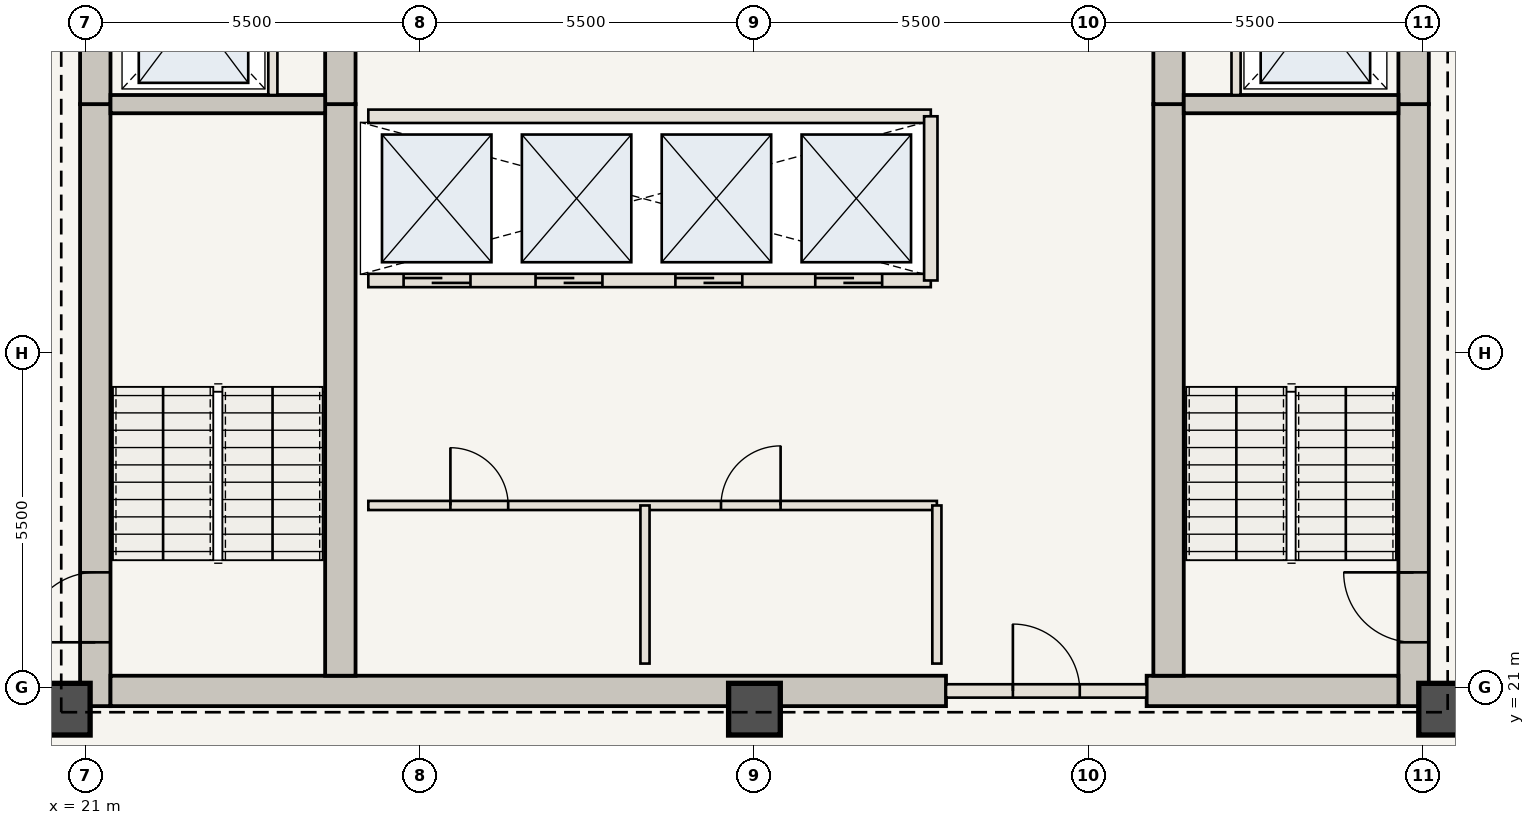
"""IFC4 building model, lengths in metres.
Left out: names, types, materials, properties, quantities, classifications, styles, units other than length and angle.
Written with IfcOpenShell. Run it as: python <this file> out.ifc"""

import sys

from ifc_helpers import new_model, si_unit, direction, frame, frame_2d, origin, origin_2d, place, context, subcontext, project, spatial, rectangle, extrude, element, fill, save


model = new_model("IFC4")
c1 = context("Model", 3, precision=1e-05, world=origin(), true_north=direction((0.0, 1.0)))
c2 = subcontext(c1, "Body", "Model", "MODEL_VIEW")
j1 = project(units=[si_unit("LENGTHUNIT", "METRE"), si_unit("PLANEANGLEUNIT", "RADIAN")], contexts=[c1])
p1 = place(None, origin())
s1 = spatial("IfcSite", under=j1, at=p1, CompositionType="ELEMENT")
p2 = place(p1, origin())
s2 = spatial("IfcBuilding", under=s1, at=p2, CompositionType="ELEMENT")
p3 = place(p2, frame((0.0, 0.0, 236.95)))
s3 = spatial("IfcBuildingStorey", under=s2, at=p3, CompositionType="ELEMENT", Elevation=236.95)
p4 = place(p3, frame((21.16, 20.7, 0.0), z_axis=(0.0, 0.0, 1.0), x_axis=(0.0, 1.0, 0.0)))
e1 = element("IfcWall", 1, at=p4, inside=s3, PredefinedType="SHEAR", context=c2, shape_type="SweptSolid", body=[
    extrude(rectangle(XDim=9.9, YDim=0.5, at=frame_2d((4.95, 0.0))), origin(), (0.0, 0.0, 1.0), 3.85),
])
p5 = place(p4, frame((1.05, 0.0, 0.0)))
e2 = element("IfcOpeningElement", 2, at=p5, cuts=e1, PredefinedType="OPENING", context=c2, shape_type="SweptSolid", body=[
    extrude(rectangle(XDim=1.15, YDim=2.15, at=frame_2d((0.575, 1.075))), frame((0.0, 0.26, 0.0), z_axis=(0.0, -1.0, 0.0), x_axis=(1.0, 0.0, 0.0)), (0.0, 0.0, 1.0), 0.52),
])
p6 = place(p3, frame((21.16, 30.6, 0.0), z_axis=(0.0, 0.0, 1.0), x_axis=(0.0, 1.0, 0.0)))
e3 = element("IfcWall", 3, at=p6, inside=s3, PredefinedType="SHEAR", context=c2, shape_type="SweptSolid", body=[
    extrude(rectangle(XDim=12.65, YDim=0.5, at=frame_2d((6.325, 0.0))), origin(), (0.0, 0.0, 1.0), 3.85),
])
p7 = place(p6, frame((4.2, 0.0, 0.0)))
e4 = element("IfcOpeningElement", 4, at=p7, cuts=e3, PredefinedType="OPENING", context=c2, shape_type="SweptSolid", body=[
    extrude(rectangle(XDim=1.1, YDim=2.15, at=frame_2d((0.55, 1.075))), frame((0.0, 0.26, 0.0), z_axis=(0.0, -1.0, 0.0), x_axis=(1.0, 0.0, 0.0)), (0.0, 0.0, 1.0), 0.52),
])
p8 = place(p6, frame((9.2, 0.0, 0.0)))
e5 = element("IfcOpeningElement", 5, at=p8, cuts=e3, PredefinedType="OPENING", context=c2, shape_type="SweptSolid", body=[
    extrude(rectangle(XDim=0.92, YDim=2.1, at=frame_2d((0.46, 1.05))), frame((0.0, 0.26, 0.0), z_axis=(0.0, -1.0, 0.0), x_axis=(1.0, 0.0, 0.0)), (0.0, 0.0, 1.0), 0.52),
])
p9 = place(p3, frame((42.84, 20.7, 0.0), z_axis=(0.0, 0.0, 1.0), x_axis=(0.0, 1.0, 0.0)))
e6 = element("IfcWall", 6, at=p9, inside=s3, PredefinedType="SHEAR", context=c2, shape_type="SweptSolid", body=[
    extrude(rectangle(XDim=9.9, YDim=0.5, at=frame_2d((4.95, 0.0))), origin(), (0.0, 0.0, 1.0), 3.85),
])
p10 = place(p9, frame((1.05, 0.0, 0.0)))
e7 = element("IfcOpeningElement", 7, at=p10, cuts=e6, PredefinedType="OPENING", context=c2, shape_type="SweptSolid", body=[
    extrude(rectangle(XDim=1.15, YDim=2.15, at=frame_2d((0.575, 1.075))), frame((0.0, 0.26, 0.0), z_axis=(0.0, -1.0, 0.0), x_axis=(1.0, 0.0, 0.0)), (0.0, 0.0, 1.0), 0.52),
])
p11 = place(p3, frame((42.84, 30.6, 0.0), z_axis=(0.0, 0.0, 1.0), x_axis=(0.0, 1.0, 0.0)))
e8 = element("IfcWall", 8, at=p11, inside=s3, PredefinedType="SHEAR", context=c2, shape_type="SweptSolid", body=[
    extrude(rectangle(XDim=12.65, YDim=0.5, at=frame_2d((6.325, 0.0))), origin(), (0.0, 0.0, 1.0), 3.85),
])
p12 = place(p11, frame((4.2, 0.0, 0.0)))
e9 = element("IfcOpeningElement", 9, at=p12, cuts=e8, PredefinedType="OPENING", context=c2, shape_type="SweptSolid", body=[
    extrude(rectangle(XDim=1.1, YDim=2.15, at=frame_2d((0.55, 1.075))), frame((0.0, 0.26, 0.0), z_axis=(0.0, -1.0, 0.0), x_axis=(1.0, 0.0, 0.0)), (0.0, 0.0, 1.0), 0.52),
])
p13 = place(p11, frame((8.4, 0.0, 0.0)))
e10 = element("IfcOpeningElement", 10, at=p13, cuts=e8, PredefinedType="OPENING", context=c2, shape_type="SweptSolid", body=[
    extrude(rectangle(XDim=0.88, YDim=2.1, at=frame_2d((0.44, 1.05))), frame((0.0, 0.26, 0.0), z_axis=(0.0, -1.0, 0.0), x_axis=(1.0, 0.0, 0.0)), (0.0, 0.0, 1.0), 0.52),
])
p14 = place(p11, frame((10.5, 0.0, 0.0)))
e11 = element("IfcOpeningElement", 11, at=p14, cuts=e8, PredefinedType="OPENING", context=c2, shape_type="SweptSolid", body=[
    extrude(rectangle(XDim=0.88, YDim=2.1, at=frame_2d((0.44, 1.05))), frame((0.0, 0.26, 0.0), z_axis=(0.0, -1.0, 0.0), x_axis=(1.0, 0.0, 0.0)), (0.0, 0.0, 1.0), 0.52),
])
p15 = place(p3, frame((21.41, 20.95, 0.0), z_axis=(0.0, 0.0, 1.0), x_axis=(1.0, 0.0, 0.0)))
e12 = element("IfcWall", 12, at=p15, inside=s3, PredefinedType="SHEAR", context=c2, shape_type="SweptSolid", body=[
    extrude(rectangle(XDim=13.74, YDim=0.5, at=frame_2d((6.87, 0.0))), origin(), (0.0, 0.0, 1.0), 3.85),
])
p16 = place(p3, frame((38.45, 20.95, 0.0), z_axis=(0.0, 0.0, 1.0), x_axis=(1.0, 0.0, 0.0)))
e13 = element("IfcWall", 13, at=p16, inside=s3, PredefinedType="SHEAR", context=c2, shape_type="SweptSolid", body=[
    extrude(rectangle(XDim=4.14, YDim=0.5, at=frame_2d((2.07, 0.0))), origin(), (0.0, 0.0, 1.0), 3.85),
])
p17 = place(p3, frame((25.19, 21.2, 0.0), z_axis=(0.0, 0.0, 1.0), x_axis=(0.0, 1.0, 0.0)))
e14 = element("IfcWall", 14, at=p17, inside=s3, PredefinedType="SHEAR", context=c2, shape_type="SweptSolid", body=[
    extrude(rectangle(XDim=9.4, YDim=0.5, at=frame_2d((4.7, 0.0))), origin(), (0.0, 0.0, 1.0), 3.85),
])
p18 = place(p3, frame((25.19, 30.6, 0.0), z_axis=(0.0, 0.0, 1.0), x_axis=(0.0, 1.0, 0.0)))
e15 = element("IfcWall", 15, at=p18, inside=s3, PredefinedType="SHEAR", context=c2, shape_type="SweptSolid", body=[
    extrude(rectangle(XDim=12.15, YDim=0.5, at=frame_2d((6.075, 0.0))), origin(), (0.0, 0.0, 1.0), 3.85),
])
p19 = place(p18, frame((6.25, 0.0, 0.0)))
e16 = element("IfcOpeningElement", 16, at=p19, cuts=e15, PredefinedType="OPENING", context=c2, shape_type="SweptSolid", body=[
    extrude(rectangle(XDim=1.1, YDim=2.15, at=frame_2d((0.55, 1.075))), frame((0.0, 0.26, 0.0), z_axis=(0.0, -1.0, 0.0), x_axis=(1.0, 0.0, 0.0)), (0.0, 0.0, 1.0), 0.52),
])
p20 = place(p3, frame((38.81, 21.2, 0.0), z_axis=(0.0, 0.0, 1.0), x_axis=(0.0, 1.0, 0.0)))
e17 = element("IfcWall", 17, at=p20, inside=s3, PredefinedType="SHEAR", context=c2, shape_type="SweptSolid", body=[
    extrude(rectangle(XDim=9.4, YDim=0.5, at=frame_2d((4.7, 0.0))), origin(), (0.0, 0.0, 1.0), 3.85),
])
p21 = place(p3, frame((38.81, 30.6, 0.0), z_axis=(0.0, 0.0, 1.0), x_axis=(0.0, 1.0, 0.0)))
e18 = element("IfcWall", 18, at=p21, inside=s3, PredefinedType="SHEAR", context=c2, shape_type="SweptSolid", body=[
    extrude(rectangle(XDim=12.15, YDim=0.5, at=frame_2d((6.075, 0.0))), origin(), (0.0, 0.0, 1.0), 3.85),
])
for number, where, z_axis, x_axis in (
    (19, (20.65, 20.65, 0.0), (0.0, 0.0, 1.0), (1.0, 0.0, 0.0)),
    (20, (32.0, 20.65, 0.0), (0.0, 0.0, 1.0), (1.0, 0.0, 0.0)),
    (21, (43.35, 20.65, 0.0), (0.0, 0.0, 1.0), (1.0, 0.0, 0.0)),
):
    element("IfcColumn", number, at=place(p3, frame(where, z_axis=z_axis, x_axis=x_axis)), inside=s3, PredefinedType="COLUMN", context=c2, shape_type="SweptSolid", body=[
        extrude(rectangle(XDim=0.85, YDim=0.85, at=origin_2d()), origin(), (0.0, 0.0, 1.0), 3.85),
    ])
for number, where, z_axis, x_axis in (
    (22, (21.41, 30.6, 0.0), (0.0, 0.0, 1.0), (1.0, 0.0, 0.0)),
    (23, (39.06, 30.6, 0.0), (0.0, 0.0, 1.0), (1.0, 0.0, 0.0)),
):
    element("IfcWall", number, at=place(p3, frame(where, z_axis=z_axis, x_axis=x_axis)), inside=s3, PredefinedType="SHEAR", context=c2, shape_type="SweptSolid", body=[
        extrude(rectangle(XDim=3.53, YDim=0.3, at=frame_2d((1.765, 0.0))), origin(), (0.0, 0.0, 1.0), 3.685),
    ])
for number, where, z_axis, x_axis in (
    (24, (24.08, 30.75, 0.0), (0.0, 0.0, 1.0), (0.0, 1.0, 0.0)),
    (25, (39.92, 30.75, 0.0), (0.0, 0.0, 1.0), (0.0, 1.0, 0.0)),
):
    element("IfcWall", number, at=place(p3, frame(where, z_axis=z_axis, x_axis=x_axis)), inside=s3, PredefinedType="STANDARD", context=c2, shape_type="SweptSolid", body=[
        extrude(rectangle(XDim=2.65, YDim=0.15, at=frame_2d((1.325, 0.0))), origin(), (0.0, 0.0, 1.0), 3.685),
    ])
p22 = place(p3, frame((35.15, 20.95, 0.0), z_axis=(0.0, 0.0, 1.0), x_axis=(1.0, 0.0, 0.0)))
e26 = element("IfcWall", 26, at=p22, inside=s3, PredefinedType="STANDARD", context=c2, shape_type="SweptSolid", body=[
    extrude(rectangle(XDim=3.3, YDim=0.22, at=frame_2d((1.65, 0.0))), origin(), (0.0, 0.0, 1.0), 3.685),
])
p23 = place(p22, frame((1.1, 0.0, 0.0)))
e27 = element("IfcOpeningElement", 27, at=p23, cuts=e26, PredefinedType="OPENING", context=c2, shape_type="SweptSolid", body=[
    extrude(rectangle(XDim=1.1, YDim=2.15, at=frame_2d((0.55, 1.075))), frame((0.0, 0.12, 0.0), z_axis=(0.0, -1.0, 0.0), x_axis=(1.0, 0.0, 0.0)), (0.0, 0.0, 1.0), 0.24),
])
p24 = place(p3, frame((25.65, 24.0, 0.0), z_axis=(0.0, 0.0, 1.0), x_axis=(1.0, 0.0, 0.0)))
e28 = element("IfcWall", 28, at=p24, inside=s3, PredefinedType="STANDARD", context=c2, shape_type="SweptSolid", body=[
    extrude(rectangle(XDim=9.35, YDim=0.15, at=frame_2d((4.675, 0.0))), origin(), (0.0, 0.0, 1.0), 3.685),
])
p25 = place(p24, frame((1.35, 0.0, 0.0)))
e29 = element("IfcOpeningElement", 29, at=p25, cuts=e28, PredefinedType="OPENING", context=c2, shape_type="SweptSolid", body=[
    extrude(rectangle(XDim=0.95, YDim=2.15, at=frame_2d((0.475, 1.075))), frame((0.0, 0.085, 0.0), z_axis=(0.0, -1.0, 0.0), x_axis=(1.0, 0.0, 0.0)), (0.0, 0.0, 1.0), 0.17),
])
p26 = place(p24, frame((5.8, 0.0, 0.0)))
e30 = element("IfcOpeningElement", 30, at=p26, cuts=e28, PredefinedType="OPENING", context=c2, shape_type="SweptSolid", body=[
    extrude(rectangle(XDim=0.98, YDim=2.2, at=frame_2d((0.49, 1.1))), frame((0.0, 0.085, 0.0), z_axis=(0.0, -1.0, 0.0), x_axis=(1.0, 0.0, 0.0)), (0.0, 0.0, 1.0), 0.17),
])
for number, where, z_axis, x_axis in (
    (31, (30.2, 21.4, 0.0), (0.0, 0.0, 1.0), (0.0, 1.0, 0.0)),
    (32, (35.0, 21.4, 0.0), (0.0, 0.0, 1.0), (0.0, 1.0, 0.0)),
):
    element("IfcWall", number, at=place(p3, frame(where, z_axis=z_axis, x_axis=x_axis)), inside=s3, PredefinedType="STANDARD", context=c2, shape_type="SweptSolid", body=[
        extrude(rectangle(XDim=2.6, YDim=0.15, at=frame_2d((1.3, 0.0))), origin(), (0.0, 0.0, 1.0), 3.685),
    ])
p27 = place(p3, frame((25.65, 27.7, 0.0), z_axis=(0.0, 0.0, 1.0), x_axis=(1.0, 0.0, 0.0)))
e33 = element("IfcWall", 33, at=p27, inside=s3, PredefinedType="STANDARD", context=c2, shape_type="SweptSolid", body=[
    extrude(rectangle(XDim=9.25, YDim=0.22, at=frame_2d((4.625, 0.0))), origin(), (0.0, 0.0, 1.0), 3.685),
])
p28 = place(p27, frame((0.58, 0.0, 0.0)))
e34 = element("IfcOpeningElement", 34, at=p28, cuts=e33, PredefinedType="OPENING", context=c2, shape_type="SweptSolid", body=[
    extrude(rectangle(XDim=1.1, YDim=2.15, at=frame_2d((0.55, 1.075))), frame((0.0, 0.12, 0.0), z_axis=(0.0, -1.0, 0.0), x_axis=(1.0, 0.0, 0.0)), (0.0, 0.0, 1.0), 0.24),
])
p29 = place(p27, frame((2.75, 0.0, 0.0)))
e35 = element("IfcOpeningElement", 35, at=p29, cuts=e33, PredefinedType="OPENING", context=c2, shape_type="SweptSolid", body=[
    extrude(rectangle(XDim=1.1, YDim=2.15, at=frame_2d((0.55, 1.075))), frame((0.0, 0.12, 0.0), z_axis=(0.0, -1.0, 0.0), x_axis=(1.0, 0.0, 0.0)), (0.0, 0.0, 1.0), 0.24),
])
p30 = place(p27, frame((5.05, 0.0, 0.0)))
e36 = element("IfcOpeningElement", 36, at=p30, cuts=e33, PredefinedType="OPENING", context=c2, shape_type="SweptSolid", body=[
    extrude(rectangle(XDim=1.1, YDim=2.15, at=frame_2d((0.55, 1.075))), frame((0.0, 0.12, 0.0), z_axis=(0.0, -1.0, 0.0), x_axis=(1.0, 0.0, 0.0)), (0.0, 0.0, 1.0), 0.24),
])
p31 = place(p27, frame((7.35, 0.0, 0.0)))
e37 = element("IfcOpeningElement", 37, at=p31, cuts=e33, PredefinedType="OPENING", context=c2, shape_type="SweptSolid", body=[
    extrude(rectangle(XDim=1.1, YDim=2.15, at=frame_2d((0.55, 1.075))), frame((0.0, 0.12, 0.0), z_axis=(0.0, -1.0, 0.0), x_axis=(1.0, 0.0, 0.0)), (0.0, 0.0, 1.0), 0.24),
])
p32 = place(p3, frame((25.65, 30.4, 0.0), z_axis=(0.0, 0.0, 1.0), x_axis=(1.0, 0.0, 0.0)))
e38 = element("IfcWall", 38, at=p32, inside=s3, PredefinedType="STANDARD", context=c2, shape_type="SweptSolid", body=[
    extrude(rectangle(XDim=9.25, YDim=0.22, at=frame_2d((4.625, 0.0))), origin(), (0.0, 0.0, 1.0), 3.685),
])
p33 = place(p3, frame((34.9, 27.7, 0.0), z_axis=(0.0, 0.0, 1.0), x_axis=(0.0, 1.0, 0.0)))
e39 = element("IfcWall", 39, at=p33, inside=s3, PredefinedType="STANDARD", context=c2, shape_type="SweptSolid", body=[
    extrude(rectangle(XDim=2.7, YDim=0.22, at=frame_2d((1.35, 0.0))), origin(), (0.0, 0.0, 1.0), 3.685),
])
p34 = place(p5, origin())
e40 = element("IfcDoor", 40, at=p34, inside=s3, OperationType="SINGLE_SWING_LEFT", PredefinedType="DOOR", context=c2, shape_type="SweptSolid", body=[
    extrude(rectangle(XDim=1.15, YDim=2.15, at=frame_2d((0.575, 1.075))), frame((0.0, 0.025, 0.0), z_axis=(0.0, -1.0, 0.0), x_axis=(1.0, 0.0, 0.0)), (0.0, 0.0, 1.0), 0.05),
])
fill(e2, e40)
p35 = place(p10, origin())
e41 = element("IfcDoor", 41, at=p35, inside=s3, OperationType="SINGLE_SWING_RIGHT", PredefinedType="DOOR", context=c2, shape_type="SweptSolid", body=[
    extrude(rectangle(XDim=1.15, YDim=2.15, at=frame_2d((0.575, 1.075))), frame((0.0, 0.025, 0.0), z_axis=(0.0, -1.0, 0.0), x_axis=(1.0, 0.0, 0.0)), (0.0, 0.0, 1.0), 0.05),
])
fill(e7, e41)
p36 = place(p23, origin())
e42 = element("IfcDoor", 42, at=p36, inside=s3, OperationType="SINGLE_SWING_LEFT", PredefinedType="DOOR", context=c2, shape_type="SweptSolid", body=[
    extrude(rectangle(XDim=1.1, YDim=2.15, at=frame_2d((0.55, 1.075))), frame((0.0, 0.025, 0.0), z_axis=(0.0, -1.0, 0.0), x_axis=(1.0, 0.0, 0.0)), (0.0, 0.0, 1.0), 0.05),
])
fill(e27, e42)
p37 = place(p25, origin())
e43 = element("IfcDoor", 43, at=p37, inside=s3, OperationType="SINGLE_SWING_LEFT", PredefinedType="DOOR", context=c2, shape_type="SweptSolid", body=[
    extrude(rectangle(XDim=0.95, YDim=2.15, at=frame_2d((0.475, 1.075))), frame((0.0, 0.025, 0.0), z_axis=(0.0, -1.0, 0.0), x_axis=(1.0, 0.0, 0.0)), (0.0, 0.0, 1.0), 0.05),
])
fill(e29, e43)
p38 = place(p26, origin())
e44 = element("IfcDoor", 44, at=p38, inside=s3, OperationType="SINGLE_SWING_RIGHT", PredefinedType="DOOR", context=c2, shape_type="SweptSolid", body=[
    extrude(rectangle(XDim=0.98, YDim=2.2, at=frame_2d((0.49, 1.1))), frame((0.0, 0.025, 0.0), z_axis=(0.0, -1.0, 0.0), x_axis=(1.0, 0.0, 0.0)), (0.0, 0.0, 1.0), 0.05),
])
fill(e30, e44)
p39 = place(p28, origin())
e45 = element("IfcDoor", 45, at=p39, inside=s3, OperationType="DOUBLE_DOOR_SLIDING", PredefinedType="DOOR", context=c2, shape_type="SweptSolid", body=[
    extrude(rectangle(XDim=1.1, YDim=2.15, at=frame_2d((0.55, 1.075))), frame((0.0, 0.025, 0.0), z_axis=(0.0, -1.0, 0.0), x_axis=(1.0, 0.0, 0.0)), (0.0, 0.0, 1.0), 0.05),
])
fill(e34, e45)
p40 = place(p29, origin())
e46 = element("IfcDoor", 46, at=p40, inside=s3, OperationType="DOUBLE_DOOR_SLIDING", PredefinedType="DOOR", context=c2, shape_type="SweptSolid", body=[
    extrude(rectangle(XDim=1.1, YDim=2.15, at=frame_2d((0.55, 1.075))), frame((0.0, 0.025, 0.0), z_axis=(0.0, -1.0, 0.0), x_axis=(1.0, 0.0, 0.0)), (0.0, 0.0, 1.0), 0.05),
])
fill(e35, e46)
p41 = place(p30, origin())
e47 = element("IfcDoor", 47, at=p41, inside=s3, OperationType="DOUBLE_DOOR_SLIDING", PredefinedType="DOOR", context=c2, shape_type="SweptSolid", body=[
    extrude(rectangle(XDim=1.1, YDim=2.15, at=frame_2d((0.55, 1.075))), frame((0.0, 0.025, 0.0), z_axis=(0.0, -1.0, 0.0), x_axis=(1.0, 0.0, 0.0)), (0.0, 0.0, 1.0), 0.05),
])
fill(e36, e47)
p42 = place(p31, origin())
e48 = element("IfcDoor", 48, at=p42, inside=s3, OperationType="DOUBLE_DOOR_SLIDING", PredefinedType="DOOR", context=c2, shape_type="SweptSolid", body=[
    extrude(rectangle(XDim=1.1, YDim=2.15, at=frame_2d((0.55, 1.075))), frame((0.0, 0.025, 0.0), z_axis=(0.0, -1.0, 0.0), x_axis=(1.0, 0.0, 0.0)), (0.0, 0.0, 1.0), 0.05),
])
fill(e37, e48)
save(model, sys.argv[1])
